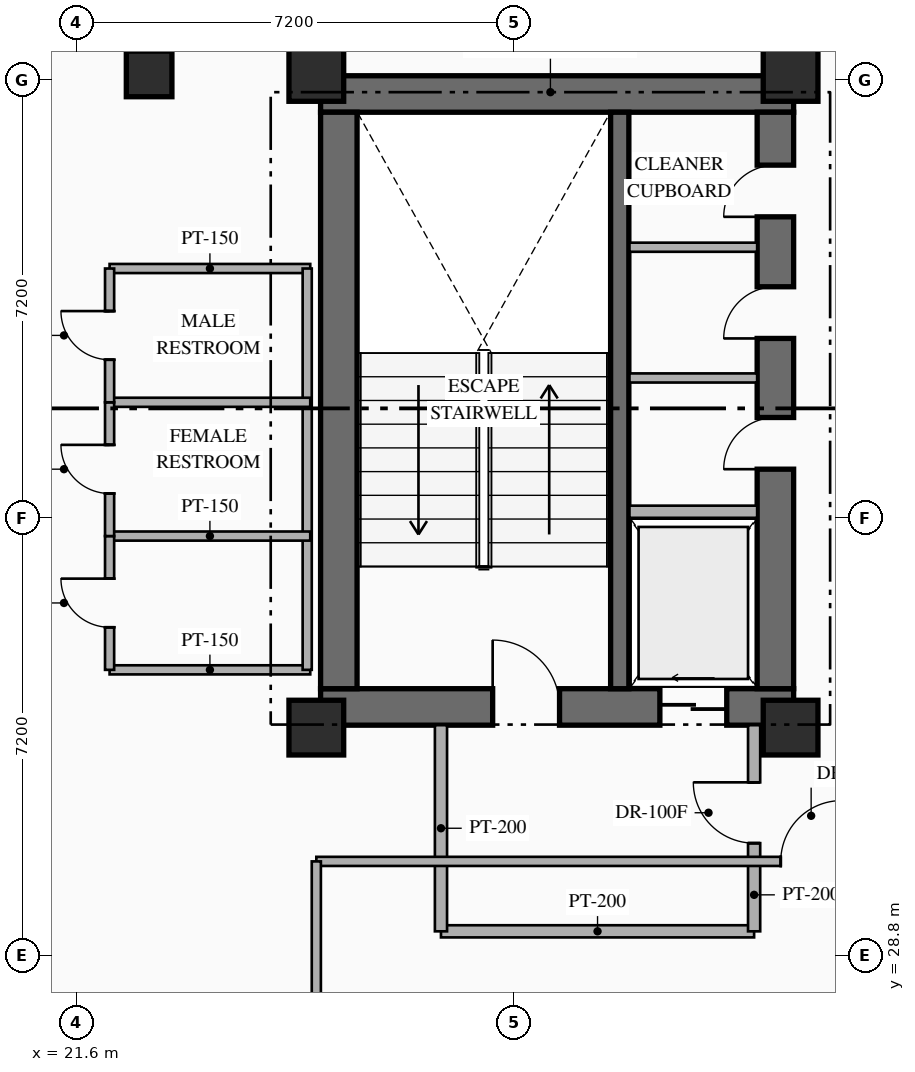
"""IFC4 building model, lengths in metres.
Left out: names, types, materials, properties, quantities, classifications, styles, units other than length and angle.
Written with IfcOpenShell. Run it as: python <this file> out.ifc"""

import sys

from ifc_helpers import new_model, si_unit, direction, frame, frame_2d, origin, origin_2d, place, context, subcontext, project, spatial, rectangle, hollow_rectangle, extrude, element, fill, save


model = new_model("IFC4")
c1 = context("Model", 3, precision=1e-05, world=origin(), true_north=direction((0.0, 1.0)))
c2 = subcontext(c1, "Body", "Model", "MODEL_VIEW")
j1 = project(units=[si_unit("LENGTHUNIT", "METRE"), si_unit("PLANEANGLEUNIT", "RADIAN")], contexts=[c1])
p1 = place(None, origin())
s1 = spatial("IfcSite", under=j1, at=p1, CompositionType="ELEMENT")
p2 = place(p1, origin())
s2 = spatial("IfcBuilding", under=s1, at=p2, CompositionType="ELEMENT")
p3 = place(p2, frame((0.0, 0.0, 170.85)))
s3 = spatial("IfcBuildingStorey", under=s2, at=p3, CompositionType="ELEMENT", Elevation=170.85)
p4 = place(p3, frame((25.62, 32.89, 0.0), z_axis=(0.0, 0.0, 1.0), x_axis=(1.0, 0.0, 0.0)))
e1 = element("IfcWall", 1, at=p4, inside=s3, PredefinedType="SHEAR", context=c2, shape_type="SweptSolid", body=[
    extrude(rectangle(XDim=7.78, YDim=0.6, at=frame_2d((3.89, 0.0))), origin(), (0.0, 0.0, 1.0), 3.6),
])
p5 = place(p4, frame((2.83, 0.0, 0.0)))
e2 = element("IfcOpeningElement", 2, at=p5, cuts=e1, PredefinedType="OPENING", context=c2, shape_type="SweptSolid", body=[
    extrude(rectangle(XDim=1.1, YDim=2.2, at=frame_2d((0.55, 1.1))), frame((0.0, 0.31, 0.0), z_axis=(0.0, -1.0, 0.0), x_axis=(1.0, 0.0, 0.0)), (0.0, 0.0, 1.0), 0.62),
])
p6 = place(p4, frame((5.58, 0.0, 0.0)))
e3 = element("IfcOpeningElement", 3, at=p6, cuts=e1, PredefinedType="OPENING", context=c2, shape_type="SweptSolid", body=[
    extrude(rectangle(XDim=1.1, YDim=2.15, at=frame_2d((0.55, 1.075))), frame((0.0, 0.31, 0.0), z_axis=(0.0, -1.0, 0.0), x_axis=(1.0, 0.0, 0.0)), (0.0, 0.0, 1.0), 0.62),
])
p7 = place(p3, frame((25.62, 42.97, 0.0), z_axis=(0.0, 0.0, 1.0), x_axis=(1.0, 0.0, 0.0)))
e4 = element("IfcWall", 4, at=p7, inside=s3, PredefinedType="SHEAR", context=c2, shape_type="SweptSolid", body=[
    extrude(rectangle(XDim=7.78, YDim=0.6, at=frame_2d((3.89, 0.0))), origin(), (0.0, 0.0, 1.0), 3.6),
])
p8 = place(p3, frame((25.92, 33.19, 0.0), z_axis=(0.0, 0.0, 1.0), x_axis=(0.0, 1.0, 0.0)))
e5 = element("IfcWall", 5, at=p8, inside=s3, PredefinedType="SHEAR", context=c2, shape_type="SweptSolid", body=[
    extrude(rectangle(XDim=9.48, YDim=0.6, at=frame_2d((4.74, 0.0))), origin(), (0.0, 0.0, 1.0), 3.6),
])
p9 = place(p3, frame((33.1, 33.19, 0.0), z_axis=(0.0, 0.0, 1.0), x_axis=(0.0, 1.0, 0.0)))
e6 = element("IfcWall", 6, at=p9, inside=s3, PredefinedType="SHEAR", context=c2, shape_type="SweptSolid", body=[
    extrude(rectangle(XDim=9.48, YDim=0.6, at=frame_2d((4.74, 0.0))), origin(), (0.0, 0.0, 1.0), 3.6),
])
p10 = place(p9, frame((3.61, 0.0, 0.0)))
e7 = element("IfcOpeningElement", 7, at=p10, cuts=e6, PredefinedType="OPENING", context=c2, shape_type="SweptSolid", body=[
    extrude(rectangle(XDim=0.85, YDim=2.08, at=frame_2d((0.425, 1.04))), frame((0.0, 0.31, 0.0), z_axis=(0.0, -1.0, 0.0), x_axis=(1.0, 0.0, 0.0)), (0.0, 0.0, 1.0), 0.62),
])
p11 = place(p9, frame((5.76, 0.0, 0.0)))
e8 = element("IfcOpeningElement", 8, at=p11, cuts=e6, PredefinedType="OPENING", context=c2, shape_type="SweptSolid", body=[
    extrude(rectangle(XDim=0.85, YDim=2.08, at=frame_2d((0.425, 1.04))), frame((0.0, 0.31, 0.0), z_axis=(0.0, -1.0, 0.0), x_axis=(1.0, 0.0, 0.0)), (0.0, 0.0, 1.0), 0.62),
])
p12 = place(p9, frame((7.76, 0.0, 0.0)))
e9 = element("IfcOpeningElement", 9, at=p12, cuts=e6, PredefinedType="OPENING", context=c2, shape_type="SweptSolid", body=[
    extrude(rectangle(XDim=0.85, YDim=2.08, at=frame_2d((0.425, 1.04))), frame((0.0, 0.31, 0.0), z_axis=(0.0, -1.0, 0.0), x_axis=(1.0, 0.0, 0.0)), (0.0, 0.0, 1.0), 0.62),
])
p13 = place(p3, frame((30.54, 33.19, 0.0), z_axis=(0.0, 0.0, 1.0), x_axis=(0.0, 1.0, 0.0)))
e10 = element("IfcWall", 10, at=p13, inside=s3, PredefinedType="SHEAR", context=c2, shape_type="SweptSolid", body=[
    extrude(rectangle(XDim=9.48, YDim=0.3, at=frame_2d((4.74, 0.0))), origin(), (0.0, 0.0, 1.0), 3.6),
])
for number, where, z_axis, x_axis in (
    (11, (25.55, 32.55, 0.0), (0.0, 0.0, 1.0), (1.0, 0.0, 0.0)),
    (12, (33.35, 32.55, 0.0), (0.0, 0.0, 1.0), (1.0, 0.0, 0.0)),
    (13, (25.55, 43.3, 0.0), (0.0, 0.0, 1.0), (1.0, 0.0, 0.0)),
    (14, (33.35, 43.3, 0.0), (0.0, 0.0, 1.0), (1.0, 0.0, 0.0)),
):
    element("IfcColumn", number, at=place(p3, frame(where, z_axis=z_axis, x_axis=x_axis)), inside=s3, PredefinedType="COLUMN", context=c2, shape_type="SweptSolid", body=[
        extrude(rectangle(XDim=0.9, YDim=0.9, at=origin_2d()), origin(), (0.0, 0.0, 1.0), 3.6),
    ])
p14 = place(p3, frame((22.8, 43.3, 0.0), z_axis=(0.0, 0.0, 1.0), x_axis=(1.0, 0.0, 0.0)))
e15 = element("IfcColumn", 15, at=p14, inside=s3, PredefinedType="COLUMN", context=c2, shape_type="SweptSolid", body=[
    extrude(hollow_rectangle(XDim=0.75, YDim=0.75, WallThickness=0.028, at=origin_2d()), origin(), (0.0, 0.0, 1.0), 3.6),
])
p15 = place(p3, frame((30.7, 36.1, 0.0), z_axis=(0.0, 0.0, 1.0), x_axis=(1.0, 0.0, 0.0)))
e16 = element("IfcWall", 16, at=p15, inside=s3, PredefinedType="STANDARD", context=c2, shape_type="SweptSolid", body=[
    extrude(rectangle(XDim=2.1, YDim=0.2, at=frame_2d((1.05, 0.0))), origin(), (0.0, 0.0, 1.0), 3.35),
])
for number, where, z_axis, x_axis in (
    (17, (30.7, 38.3, 0.0), (0.0, 0.0, 1.0), (1.0, 0.0, 0.0)),
    (18, (30.7, 40.45, 0.0), (0.0, 0.0, 1.0), (1.0, 0.0, 0.0)),
):
    element("IfcWall", number, at=place(p3, frame(where, z_axis=z_axis, x_axis=x_axis)), inside=s3, PredefinedType="PARTITIONING", context=c2, shape_type="SweptSolid", body=[
        extrude(rectangle(XDim=2.1, YDim=0.15, at=frame_2d((1.05, 0.0))), origin(), (0.0, 0.0, 1.0), 3.35),
    ])
p16 = place(p3, frame((27.6, 29.2, 0.0), z_axis=(0.0, 0.0, 1.0), x_axis=(1.0, 0.0, 0.0)))
e19 = element("IfcWall", 19, at=p16, inside=s3, PredefinedType="STANDARD", context=c2, shape_type="SweptSolid", body=[
    extrude(rectangle(XDim=5.15, YDim=0.2, at=frame_2d((2.575, 0.0))), origin(), (0.0, 0.0, 1.0), 3.35),
])
p17 = place(p3, frame((27.6, 29.2, 0.0), z_axis=(0.0, 0.0, 1.0), x_axis=(0.0, 1.0, 0.0)))
e20 = element("IfcWall", 20, at=p17, inside=s3, PredefinedType="STANDARD", context=c2, shape_type="SweptSolid", body=[
    extrude(rectangle(XDim=3.39, YDim=0.2, at=frame_2d((1.695, 0.0))), origin(), (0.0, 0.0, 1.0), 3.35),
])
p18 = place(p3, frame((32.75, 29.2, 0.0), z_axis=(0.0, 0.0, 1.0), x_axis=(0.0, 1.0, 0.0)))
e21 = element("IfcWall", 21, at=p18, inside=s3, PredefinedType="STANDARD", context=c2, shape_type="SweptSolid", body=[
    extrude(rectangle(XDim=3.39, YDim=0.2, at=frame_2d((1.695, 0.0))), origin(), (0.0, 0.0, 1.0), 3.35),
])
p19 = place(p18, frame((1.45, 0.0, 0.0)))
e22 = element("IfcOpeningElement", 22, at=p19, cuts=e21, PredefinedType="OPENING", context=c2, shape_type="SweptSolid", body=[
    extrude(rectangle(XDim=1.0, YDim=2.2, at=frame_2d((0.5, 1.1))), frame((0.0, 0.11, 0.0), z_axis=(0.0, -1.0, 0.0), x_axis=(1.0, 0.0, 0.0)), (0.0, 0.0, 1.0), 0.22),
])
for number, where, z_axis, x_axis in (
    (23, (22.15, 33.5, 0.0), (0.0, 0.0, 1.0), (1.0, 0.0, 0.0)),
    (24, (22.15, 40.1, 0.0), (0.0, 0.0, 1.0), (1.0, 0.0, 0.0)),
):
    element("IfcWall", number, at=place(p3, frame(where, z_axis=z_axis, x_axis=x_axis)), inside=s3, PredefinedType="PARTITIONING", context=c2, shape_type="SweptSolid", body=[
        extrude(rectangle(XDim=3.3, YDim=0.15, at=frame_2d((1.65, 0.0))), origin(), (0.0, 0.0, 1.0), 3.35),
    ])
p20 = place(p3, frame((25.4, 33.5, 0.0), z_axis=(0.0, 0.0, 1.0), x_axis=(0.0, 1.0, 0.0)))
e25 = element("IfcWall", 25, at=p20, inside=s3, PredefinedType="PARTITIONING", context=c2, shape_type="SweptSolid", body=[
    extrude(rectangle(XDim=6.6, YDim=0.15, at=frame_2d((3.3, 0.0))), origin(), (0.0, 0.0, 1.0), 3.35),
])
for number, where, z_axis, x_axis in (
    (26, (22.15, 35.7, 0.0), (0.0, 0.0, 1.0), (1.0, 0.0, 0.0)),
    (27, (22.15, 37.9, 0.0), (0.0, 0.0, 1.0), (1.0, 0.0, 0.0)),
):
    element("IfcWall", number, at=place(p3, frame(where, z_axis=z_axis, x_axis=x_axis)), inside=s3, PredefinedType="PARTITIONING", context=c2, shape_type="SweptSolid", body=[
        extrude(rectangle(XDim=3.3, YDim=0.15, at=frame_2d((1.65, 0.0))), origin(), (0.0, 0.0, 1.0), 3.35),
    ])
p21 = place(p3, frame((22.15, 33.5, 0.0), z_axis=(0.0, 0.0, 1.0), x_axis=(0.0, 1.0, 0.0)))
e28 = element("IfcWall", 28, at=p21, inside=s3, PredefinedType="PARTITIONING", context=c2, shape_type="SweptSolid", body=[
    extrude(rectangle(XDim=2.2, YDim=0.15, at=frame_2d((1.1, 0.0))), origin(), (0.0, 0.0, 1.0), 3.35),
])
p22 = place(p21, frame((0.7, 0.0, 0.0)))
e29 = element("IfcOpeningElement", 29, at=p22, cuts=e28, PredefinedType="OPENING", context=c2, shape_type="SweptSolid", body=[
    extrude(rectangle(XDim=0.8, YDim=2.06, at=frame_2d((0.4, 1.03))), frame((0.0, 0.085, 0.0), z_axis=(0.0, -1.0, 0.0), x_axis=(1.0, 0.0, 0.0)), (0.0, 0.0, 1.0), 0.17),
])
p23 = place(p3, frame((22.15, 35.7, 0.0), z_axis=(0.0, 0.0, 1.0), x_axis=(0.0, 1.0, 0.0)))
e30 = element("IfcWall", 30, at=p23, inside=s3, PredefinedType="PARTITIONING", context=c2, shape_type="SweptSolid", body=[
    extrude(rectangle(XDim=2.2, YDim=0.15, at=frame_2d((1.1, 0.0))), origin(), (0.0, 0.0, 1.0), 3.35),
])
p24 = place(p23, frame((0.7, 0.0, 0.0)))
e31 = element("IfcOpeningElement", 31, at=p24, cuts=e30, PredefinedType="OPENING", context=c2, shape_type="SweptSolid", body=[
    extrude(rectangle(XDim=0.8, YDim=2.06, at=frame_2d((0.4, 1.03))), frame((0.0, 0.085, 0.0), z_axis=(0.0, -1.0, 0.0), x_axis=(1.0, 0.0, 0.0)), (0.0, 0.0, 1.0), 0.17),
])
p25 = place(p3, frame((22.15, 37.9, 0.0), z_axis=(0.0, 0.0, 1.0), x_axis=(0.0, 1.0, 0.0)))
e32 = element("IfcWall", 32, at=p25, inside=s3, PredefinedType="PARTITIONING", context=c2, shape_type="SweptSolid", body=[
    extrude(rectangle(XDim=2.2, YDim=0.15, at=frame_2d((1.1, 0.0))), origin(), (0.0, 0.0, 1.0), 3.35),
])
p26 = place(p25, frame((0.7, 0.0, 0.0)))
e33 = element("IfcOpeningElement", 33, at=p26, cuts=e32, PredefinedType="OPENING", context=c2, shape_type="SweptSolid", body=[
    extrude(rectangle(XDim=0.8, YDim=2.06, at=frame_2d((0.4, 1.03))), frame((0.0, 0.085, 0.0), z_axis=(0.0, -1.0, 0.0), x_axis=(1.0, 0.0, 0.0)), (0.0, 0.0, 1.0), 0.17),
])
p27 = place(p3, frame((25.55, 30.35, 0.0), z_axis=(0.0, 0.0, 1.0), x_axis=(1.0, 0.0, 0.0)))
e34 = element("IfcWall", 34, at=p27, inside=s3, PredefinedType="PARTITIONING", context=c2, shape_type="SweptSolid", body=[
    extrude(rectangle(XDim=9.4, YDim=0.15, at=frame_2d((4.7, 0.0))), origin(), (0.0, 0.0, 1.0), 3.35),
])
p28 = place(p27, frame((7.638, 0.0, 0.0)))
e35 = element("IfcOpeningElement", 35, at=p28, cuts=e34, PredefinedType="OPENING", context=c2, shape_type="SweptSolid", body=[
    extrude(rectangle(XDim=1.0, YDim=2.15, at=frame_2d((0.5, 1.075))), frame((0.0, 0.085, 0.0), z_axis=(0.0, -1.0, 0.0), x_axis=(1.0, 0.0, 0.0)), (0.0, 0.0, 1.0), 0.17),
])
p29 = place(p3, frame((25.55, 23.2, 0.0), z_axis=(0.0, 0.0, 1.0), x_axis=(0.0, 1.0, 0.0)))
e36 = element("IfcWall", 36, at=p29, inside=s3, PredefinedType="PARTITIONING", context=c2, shape_type="SweptSolid", body=[
    extrude(rectangle(XDim=7.15, YDim=0.15, at=frame_2d((3.575, 0.0))), origin(), (0.0, 0.0, 1.0), 2.695),
])
p30 = place(p5, origin())
e37 = element("IfcDoor", 37, at=p30, inside=s3, OperationType="SINGLE_SWING_LEFT", PredefinedType="DOOR", context=c2, shape_type="SweptSolid", body=[
    extrude(rectangle(XDim=1.1, YDim=2.2, at=frame_2d((0.55, 1.1))), frame((0.0, 0.025, 0.0), z_axis=(0.0, -1.0, 0.0), x_axis=(1.0, 0.0, 0.0)), (0.0, 0.0, 1.0), 0.05),
])
fill(e2, e37)
p31 = place(p6, origin())
e38 = element("IfcDoor", 38, at=p31, inside=s3, OperationType="SLIDING_TO_LEFT", PredefinedType="USERDEFINED", context=c2, shape_type="SweptSolid", body=[
    extrude(rectangle(XDim=1.1, YDim=2.15, at=frame_2d((0.55, 1.075))), frame((0.0, 0.025, 0.0), z_axis=(0.0, -1.0, 0.0), x_axis=(1.0, 0.0, 0.0)), (0.0, 0.0, 1.0), 0.05),
])
fill(e3, e38)
p32 = place(p10, origin())
e39 = element("IfcDoor", 39, at=p32, inside=s3, OperationType="SINGLE_SWING_LEFT", PredefinedType="DOOR", context=c2, shape_type="SweptSolid", body=[
    extrude(rectangle(XDim=0.85, YDim=2.08, at=frame_2d((0.425, 1.04))), frame((0.0, 0.025, 0.0), z_axis=(0.0, -1.0, 0.0), x_axis=(1.0, 0.0, 0.0)), (0.0, 0.0, 1.0), 0.05),
])
fill(e7, e39)
p33 = place(p11, origin())
e40 = element("IfcDoor", 40, at=p33, inside=s3, OperationType="SINGLE_SWING_LEFT", PredefinedType="DOOR", context=c2, shape_type="SweptSolid", body=[
    extrude(rectangle(XDim=0.85, YDim=2.08, at=frame_2d((0.425, 1.04))), frame((0.0, 0.025, 0.0), z_axis=(0.0, -1.0, 0.0), x_axis=(1.0, 0.0, 0.0)), (0.0, 0.0, 1.0), 0.05),
])
fill(e8, e40)
p34 = place(p12, origin())
e41 = element("IfcDoor", 41, at=p34, inside=s3, OperationType="SINGLE_SWING_LEFT", PredefinedType="DOOR", context=c2, shape_type="SweptSolid", body=[
    extrude(rectangle(XDim=0.85, YDim=2.08, at=frame_2d((0.425, 1.04))), frame((0.0, 0.025, 0.0), z_axis=(0.0, -1.0, 0.0), x_axis=(1.0, 0.0, 0.0)), (0.0, 0.0, 1.0), 0.05),
])
fill(e9, e41)
p35 = place(p19, origin())
e42 = element("IfcDoor", 42, at=p35, inside=s3, OperationType="SINGLE_SWING_RIGHT", PredefinedType="DOOR", context=c2, shape_type="SweptSolid", body=[
    extrude(rectangle(XDim=1.0, YDim=2.2, at=frame_2d((0.5, 1.1))), frame((0.0, 0.025, 0.0), z_axis=(0.0, -1.0, 0.0), x_axis=(1.0, 0.0, 0.0)), (0.0, 0.0, 1.0), 0.05),
])
fill(e22, e42)
p36 = place(p22, origin())
e43 = element("IfcDoor", 43, at=p36, inside=s3, OperationType="SINGLE_SWING_RIGHT", PredefinedType="DOOR", context=c2, shape_type="SweptSolid", body=[
    extrude(rectangle(XDim=0.8, YDim=2.06, at=frame_2d((0.4, 1.03))), frame((0.0, 0.025, 0.0), z_axis=(0.0, -1.0, 0.0), x_axis=(1.0, 0.0, 0.0)), (0.0, 0.0, 1.0), 0.05),
])
fill(e29, e43)
p37 = place(p24, origin())
e44 = element("IfcDoor", 44, at=p37, inside=s3, OperationType="SINGLE_SWING_RIGHT", PredefinedType="DOOR", context=c2, shape_type="SweptSolid", body=[
    extrude(rectangle(XDim=0.8, YDim=2.06, at=frame_2d((0.4, 1.03))), frame((0.0, 0.025, 0.0), z_axis=(0.0, -1.0, 0.0), x_axis=(1.0, 0.0, 0.0)), (0.0, 0.0, 1.0), 0.05),
])
fill(e31, e44)
p38 = place(p26, origin())
e45 = element("IfcDoor", 45, at=p38, inside=s3, OperationType="SINGLE_SWING_RIGHT", PredefinedType="DOOR", context=c2, shape_type="SweptSolid", body=[
    extrude(rectangle(XDim=0.8, YDim=2.06, at=frame_2d((0.4, 1.03))), frame((0.0, 0.025, 0.0), z_axis=(0.0, -1.0, 0.0), x_axis=(1.0, 0.0, 0.0)), (0.0, 0.0, 1.0), 0.05),
])
fill(e33, e45)
p39 = place(p28, origin())
e46 = element("IfcDoor", 46, at=p39, inside=s3, OperationType="SINGLE_SWING_RIGHT", PredefinedType="DOOR", context=c2, shape_type="SweptSolid", body=[
    extrude(rectangle(XDim=1.0, YDim=2.15, at=frame_2d((0.5, 1.075))), frame((0.0, 0.025, 0.0), z_axis=(0.0, -1.0, 0.0), x_axis=(1.0, 0.0, 0.0)), (0.0, 0.0, 1.0), 0.05),
])
fill(e35, e46)
save(model, sys.argv[1])
